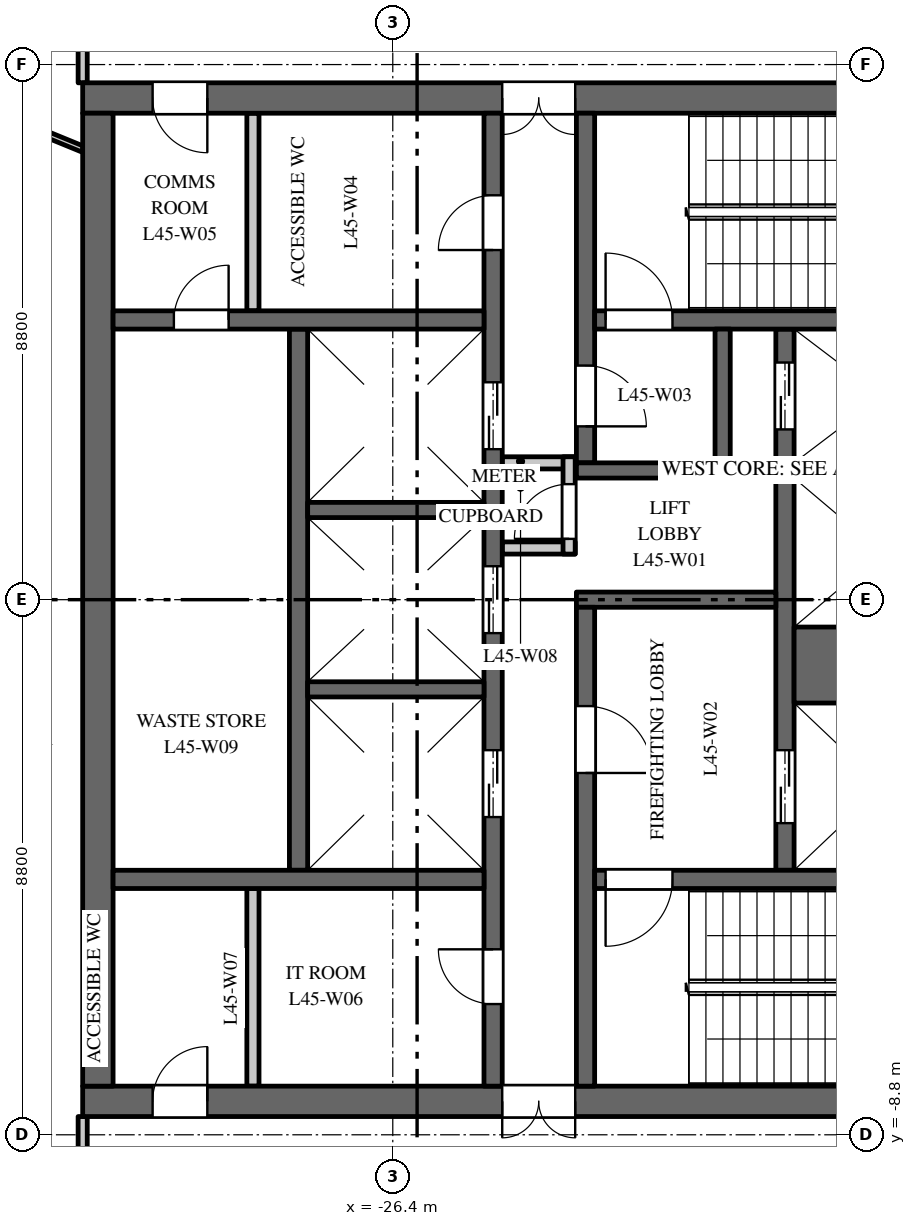
"""IFC4 building model, lengths in metres.
Left out: names, types, materials, properties, quantities, classifications, styles, units other than length and angle.
Written with IfcOpenShell. Run it as: python <this file> out.ifc"""

import sys

from ifc_helpers import new_model, si_unit, direction, frame, frame_2d, origin, place, context, subcontext, project, spatial, rectangle, extrude, element, fill, save


model = new_model("IFC4")
c1 = context("Model", 3, precision=1e-05, world=origin(), true_north=direction((0.0, 1.0)))
c2 = subcontext(c1, "Body", "Model", "MODEL_VIEW")
j1 = project(units=[si_unit("LENGTHUNIT", "METRE"), si_unit("PLANEANGLEUNIT", "RADIAN")], contexts=[c1])
p1 = place(None, origin())
s1 = spatial("IfcSite", under=j1, at=p1, CompositionType="ELEMENT")
p2 = place(p1, origin())
s2 = spatial("IfcBuilding", under=s1, at=p2, CompositionType="ELEMENT")
p3 = place(p2, frame((0.0, 0.0, 194.0)))
s3 = spatial("IfcBuildingStorey", under=s2, at=p3, CompositionType="ELEMENT", Elevation=194.0)
p4 = place(p3, frame((-16.5, 8.25, 0.0), z_axis=(0.0, 0.0, 1.0), x_axis=(-1.0, 0.0, 0.0)))
e1 = element("IfcWall", 1, at=p4, inside=s3, PredefinedType="SHEAR", context=c2, shape_type="SweptSolid", body=[
    extrude(rectangle(XDim=15.0, YDim=0.5, at=frame_2d((7.5, 0.0))), origin(), (0.0, 0.0, 1.0), 3.7),
])
p5 = place(p4, frame((6.9, 0.0, 0.0)))
e2 = element("IfcOpeningElement", 2, at=p5, cuts=e1, PredefinedType="OPENING", context=c2, shape_type="SweptSolid", body=[
    extrude(rectangle(XDim=1.2, YDim=2.1, at=frame_2d((0.6, 1.05))), frame((0.0, 0.26, 0.0), z_axis=(0.0, -1.0, 0.0), x_axis=(1.0, 0.0, 0.0)), (0.0, 0.0, 1.0), 0.52),
])
p6 = place(p4, frame((12.95, 0.0, 0.0)))
e3 = element("IfcOpeningElement", 3, at=p6, cuts=e1, PredefinedType="OPENING", context=c2, shape_type="SweptSolid", body=[
    extrude(rectangle(XDim=0.9, YDim=2.1, at=frame_2d((0.45, 1.05))), frame((0.0, 0.26, 0.0), z_axis=(0.0, -1.0, 0.0), x_axis=(1.0, 0.0, 0.0)), (0.0, 0.0, 1.0), 0.52),
])
p7 = place(p3, frame((-16.5, -8.25, 0.0), z_axis=(0.0, 0.0, 1.0), x_axis=(-1.0, 0.0, 0.0)))
e4 = element("IfcWall", 4, at=p7, inside=s3, PredefinedType="SHEAR", context=c2, shape_type="SweptSolid", body=[
    extrude(rectangle(XDim=15.0, YDim=0.5, at=frame_2d((7.5, 0.0))), origin(), (0.0, 0.0, 1.0), 3.7),
])
p8 = place(p7, frame((6.9, 0.0, 0.0)))
e5 = element("IfcOpeningElement", 5, at=p8, cuts=e4, PredefinedType="OPENING", context=c2, shape_type="SweptSolid", body=[
    extrude(rectangle(XDim=1.2, YDim=2.1, at=frame_2d((0.6, 1.05))), frame((0.0, 0.26, 0.0), z_axis=(0.0, -1.0, 0.0), x_axis=(1.0, 0.0, 0.0)), (0.0, 0.0, 1.0), 0.52),
])
p9 = place(p7, frame((12.95, 0.0, 0.0)))
e6 = element("IfcOpeningElement", 6, at=p9, cuts=e4, PredefinedType="OPENING", context=c2, shape_type="SweptSolid", body=[
    extrude(rectangle(XDim=0.9, YDim=2.1, at=frame_2d((0.45, 1.05))), frame((0.0, 0.26, 0.0), z_axis=(0.0, -1.0, 0.0), x_axis=(1.0, 0.0, 0.0)), (0.0, 0.0, 1.0), 0.52),
])
p10 = place(p3, frame((-27.95, -4.45, 0.0), z_axis=(0.0, 0.0, 1.0), x_axis=(0.0, 1.0, 0.0)))
e7 = element("IfcWall", 7, at=p10, inside=s3, PredefinedType="SHEAR", context=c2, shape_type="SweptSolid", body=[
    extrude(rectangle(XDim=8.9, YDim=0.3, at=frame_2d((4.45, 0.0))), origin(), (0.0, 0.0, 1.0), 3.7),
])
p11 = place(p3, frame((-19.95, -4.45, 0.0), z_axis=(0.0, 0.0, 1.0), x_axis=(0.0, 1.0, 0.0)))
e8 = element("IfcWall", 8, at=p11, inside=s3, PredefinedType="SHEAR", context=c2, shape_type="SweptSolid", body=[
    extrude(rectangle(XDim=8.9, YDim=0.3, at=frame_2d((4.45, 0.0))), origin(), (0.0, 0.0, 1.0), 3.7),
])
p12 = place(p11, frame((0.775, 0.0, 0.0)))
e9 = element("IfcOpeningElement", 9, at=p12, cuts=e8, PredefinedType="OPENING", context=c2, shape_type="SweptSolid", body=[
    extrude(rectangle(XDim=1.2, YDim=2.1, at=frame_2d((0.6, 1.05))), frame((0.0, 0.16, 0.0), z_axis=(0.0, -1.0, 0.0), x_axis=(1.0, 0.0, 0.0)), (0.0, 0.0, 1.0), 0.32),
])
p13 = place(p11, frame((7.25, 0.0, 0.0)))
e10 = element("IfcOpeningElement", 10, at=p13, cuts=e8, PredefinedType="OPENING", context=c2, shape_type="SweptSolid", body=[
    extrude(rectangle(XDim=1.1, YDim=2.1, at=frame_2d((0.55, 1.05))), frame((0.0, 0.16, 0.0), z_axis=(0.0, -1.0, 0.0), x_axis=(1.0, 0.0, 0.0)), (0.0, 0.0, 1.0), 0.32),
])
p14 = place(p3, frame((-24.75, -8.0, 0.0), z_axis=(0.0, 0.0, 1.0), x_axis=(0.0, 1.0, 0.0)))
e11 = element("IfcWall", 11, at=p14, inside=s3, PredefinedType="SHEAR", context=c2, shape_type="SweptSolid", body=[
    extrude(rectangle(XDim=16.0, YDim=0.3, at=frame_2d((8.0, 0.0))), origin(), (0.0, 0.0, 1.0), 3.7),
])
p15 = place(p14, frame((4.425, 0.0, 0.0)))
e12 = element("IfcOpeningElement", 12, at=p15, cuts=e11, PredefinedType="OPENING", context=c2, shape_type="SweptSolid", body=[
    extrude(rectangle(XDim=1.1, YDim=2.1, at=frame_2d((0.55, 1.05))), frame((0.0, 0.16, 0.0), z_axis=(0.0, -1.0, 0.0), x_axis=(1.0, 0.0, 0.0)), (0.0, 0.0, 1.0), 0.32),
])
p16 = place(p14, frame((7.45, 0.0, 0.0)))
e13 = element("IfcOpeningElement", 13, at=p16, cuts=e11, PredefinedType="OPENING", context=c2, shape_type="SweptSolid", body=[
    extrude(rectangle(XDim=1.1, YDim=2.1, at=frame_2d((0.55, 1.05))), frame((0.0, 0.16, 0.0), z_axis=(0.0, -1.0, 0.0), x_axis=(1.0, 0.0, 0.0)), (0.0, 0.0, 1.0), 0.32),
])
p17 = place(p14, frame((10.475, 0.0, 0.0)))
e14 = element("IfcOpeningElement", 14, at=p17, cuts=e11, PredefinedType="OPENING", context=c2, shape_type="SweptSolid", body=[
    extrude(rectangle(XDim=1.1, YDim=2.1, at=frame_2d((0.55, 1.05))), frame((0.0, 0.16, 0.0), z_axis=(0.0, -1.0, 0.0), x_axis=(1.0, 0.0, 0.0)), (0.0, 0.0, 1.0), 0.32),
])
p18 = place(p14, frame((13.75, 0.0, 0.0)))
e15 = element("IfcOpeningElement", 15, at=p18, cuts=e11, PredefinedType="OPENING", context=c2, shape_type="SweptSolid", body=[
    extrude(rectangle(XDim=0.9, YDim=2.1, at=frame_2d((0.45, 1.05))), frame((0.0, 0.16, 0.0), z_axis=(0.0, -1.0, 0.0), x_axis=(1.0, 0.0, 0.0)), (0.0, 0.0, 1.0), 0.32),
])
p19 = place(p14, frame((1.35, 0.0, 0.0)))
e16 = element("IfcOpeningElement", 16, at=p19, cuts=e11, PredefinedType="OPENING", context=c2, shape_type="SweptSolid", body=[
    extrude(rectangle(XDim=0.9, YDim=2.1, at=frame_2d((0.45, 1.05))), frame((0.0, 0.16, 0.0), z_axis=(0.0, -1.0, 0.0), x_axis=(1.0, 0.0, 0.0)), (0.0, 0.0, 1.0), 0.32),
])
p20 = place(p3, frame((-20.1, 0.0, 0.0), z_axis=(0.0, 0.0, 1.0), x_axis=(-1.0, 0.0, 0.0)))
e17 = element("IfcWall", 17, at=p20, inside=s3, PredefinedType="SHEAR", context=c2, shape_type="SweptSolid", body=[
    extrude(rectangle(XDim=3.28, YDim=0.25, at=frame_2d((1.64, 0.0))), origin(), (0.0, 0.0, 1.0), 3.7),
])
for number, where, z_axis, x_axis in (
    (18, (-23.4, 0.85, 0.0), (0.0, 0.0, 1.0), (-1.0, 0.0, 0.0)),
    (19, (-23.4, 2.25, 0.0), (0.0, 0.0, 1.0), (-1.0, 0.0, 0.0)),
):
    element("IfcWall", number, at=place(p3, frame(where, z_axis=z_axis, x_axis=x_axis)), inside=s3, PredefinedType="PARTITIONING", context=c2, shape_type="SweptSolid", body=[
        extrude(rectangle(XDim=1.2, YDim=0.2, at=frame_2d((0.6, 0.0))), origin(), (0.0, 0.0, 1.0), 3.7),
    ])
p21 = place(p3, frame((-23.5, 0.75, 0.0), z_axis=(0.0, 0.0, 1.0), x_axis=(0.0, 1.0, 0.0)))
e20 = element("IfcWall", 20, at=p21, inside=s3, PredefinedType="PARTITIONING", context=c2, shape_type="SweptSolid", body=[
    extrude(rectangle(XDim=1.6, YDim=0.2, at=frame_2d((0.8, 0.0))), origin(), (0.0, 0.0, 1.0), 3.7),
])
p22 = place(p21, frame((0.25, 0.0, 0.0)))
e21 = element("IfcOpeningElement", 21, at=p22, cuts=e20, PredefinedType="OPENING", context=c2, shape_type="SweptSolid", body=[
    extrude(rectangle(XDim=0.9, YDim=2.1, at=frame_2d((0.45, 1.05))), frame((0.0, 0.11, 0.0), z_axis=(0.0, -1.0, 0.0), x_axis=(1.0, 0.0, 0.0)), (0.0, 0.0, 1.0), 0.22),
])
p23 = place(p3, frame((-31.25, -8.0, 0.0), z_axis=(0.0, 0.0, 1.0), x_axis=(0.0, 1.0, 0.0)))
e22 = element("IfcWall", 22, at=p23, inside=s3, PredefinedType="SHEAR", context=c2, shape_type="SweptSolid", body=[
    extrude(rectangle(XDim=16.0, YDim=0.5, at=frame_2d((8.0, 0.0))), origin(), (0.0, 0.0, 1.0), 3.7),
])
p24 = place(p3, frame((-24.9, 4.6, 0.0), z_axis=(0.0, 0.0, 1.0), x_axis=(-1.0, 0.0, 0.0)))
e23 = element("IfcWall", 23, at=p24, inside=s3, PredefinedType="SHEAR", context=c2, shape_type="SweptSolid", body=[
    extrude(rectangle(XDim=6.1, YDim=0.3, at=frame_2d((3.05, 0.0))), origin(), (0.0, 0.0, 1.0), 3.7),
])
p25 = place(p24, frame((4.2, 0.0, 0.0)))
e24 = element("IfcOpeningElement", 24, at=p25, cuts=e23, PredefinedType="OPENING", context=c2, shape_type="SweptSolid", body=[
    extrude(rectangle(XDim=0.9, YDim=2.1, at=frame_2d((0.45, 1.05))), frame((0.0, 0.16, 0.0), z_axis=(0.0, -1.0, 0.0), x_axis=(1.0, 0.0, 0.0)), (0.0, 0.0, 1.0), 0.32),
])
for number, where, z_axis, x_axis in (
    (25, (-28.7, 4.75, 0.0), (0.0, 0.0, 1.0), (0.0, 1.0, 0.0)),
    (26, (-28.7, -8.0, 0.0), (0.0, 0.0, 1.0), (0.0, 1.0, 0.0)),
):
    element("IfcWall", number, at=place(p3, frame(where, z_axis=z_axis, x_axis=x_axis)), inside=s3, PredefinedType="PARTITIONING", context=c2, shape_type="SweptSolid", body=[
        extrude(rectangle(XDim=3.25, YDim=0.2, at=frame_2d((1.625, 0.0))), origin(), (0.0, 0.0, 1.0), 3.7),
    ])
p26 = place(p3, frame((-24.9, -4.6, 0.0), z_axis=(0.0, 0.0, 1.0), x_axis=(-1.0, 0.0, 0.0)))
e27 = element("IfcWall", 27, at=p26, inside=s3, PredefinedType="SHEAR", context=c2, shape_type="SweptSolid", body=[
    extrude(rectangle(XDim=6.1, YDim=0.3, at=frame_2d((3.05, 0.0))), origin(), (0.0, 0.0, 1.0), 3.7),
])
p27 = place(p3, frame((-16.9, -1.075, 0.0), z_axis=(0.0, 0.0, 1.0), x_axis=(-1.0, 0.0, 0.0)))
e28 = element("IfcWall", 28, at=p27, inside=s3, PredefinedType="SHEAR", context=c2, shape_type="SweptSolid", body=[
    extrude(rectangle(XDim=2.9, YDim=1.25, at=frame_2d((1.45, 0.0))), origin(), (0.0, 0.0, 1.0), 3.7),
])
for number, where, z_axis, x_axis in (
    (29, (-16.9, 2.125, 0.0), (0.0, 0.0, 1.0), (-1.0, 0.0, 0.0)),
    (30, (-24.9, -1.475, 0.0), (0.0, 0.0, 1.0), (-1.0, 0.0, 0.0)),
    (31, (-24.9, 1.475, 0.0), (0.0, 0.0, 1.0), (-1.0, 0.0, 0.0)),
):
    element("IfcWall", number, at=place(p3, frame(where, z_axis=z_axis, x_axis=x_axis)), inside=s3, PredefinedType="SHEAR", context=c2, shape_type="SweptSolid", body=[
        extrude(rectangle(XDim=2.9, YDim=0.25, at=frame_2d((1.45, 0.0))), origin(), (0.0, 0.0, 1.0), 3.7),
    ])
p28 = place(p3, frame((-23.23, 2.25, 0.0), z_axis=(0.0, 0.0, 1.0), x_axis=(0.0, 1.0, 0.0)))
e32 = element("IfcWall", 32, at=p28, inside=s3, PredefinedType="SHEAR", context=c2, shape_type="SweptSolid", body=[
    extrude(rectangle(XDim=5.75, YDim=0.3, at=frame_2d((2.875, 0.0))), origin(), (0.0, 0.0, 1.0), 3.7),
])
p29 = place(p28, frame((0.6, 0.0, 0.0)))
e33 = element("IfcOpeningElement", 33, at=p29, cuts=e32, PredefinedType="OPENING", context=c2, shape_type="SweptSolid", body=[
    extrude(rectangle(XDim=1.0, YDim=2.1, at=frame_2d((0.5, 1.05))), frame((0.0, 0.16, 0.0), z_axis=(0.0, -1.0, 0.0), x_axis=(1.0, 0.0, 0.0)), (0.0, 0.0, 1.0), 0.32),
])
p30 = place(p3, frame((-23.23, -8.0, 0.0), z_axis=(0.0, 0.0, 1.0), x_axis=(0.0, 1.0, 0.0)))
e34 = element("IfcWall", 34, at=p30, inside=s3, PredefinedType="SHEAR", context=c2, shape_type="SweptSolid", body=[
    extrude(rectangle(XDim=7.875, YDim=0.3, at=frame_2d((3.938, 0.0))), origin(), (0.0, 0.0, 1.0), 3.7),
])
p31 = place(p30, frame((5.15, 0.0, 0.0)))
e35 = element("IfcOpeningElement", 35, at=p31, cuts=e34, PredefinedType="OPENING", context=c2, shape_type="SweptSolid", body=[
    extrude(rectangle(XDim=1.1, YDim=2.1, at=frame_2d((0.55, 1.05))), frame((0.0, 0.16, 0.0), z_axis=(0.0, -1.0, 0.0), x_axis=(1.0, 0.0, 0.0)), (0.0, 0.0, 1.0), 0.32),
])
p32 = place(p3, frame((-16.9, 4.6, 0.0), z_axis=(0.0, 0.0, 1.0), x_axis=(-1.0, 0.0, 0.0)))
e36 = element("IfcWall", 36, at=p32, inside=s3, PredefinedType="SHEAR", context=c2, shape_type="SweptSolid", body=[
    extrude(rectangle(XDim=6.18, YDim=0.3, at=frame_2d((3.09, 0.0))), origin(), (0.0, 0.0, 1.0), 3.7),
])
p33 = place(p32, frame((4.9, 0.0, 0.0)))
e37 = element("IfcOpeningElement", 37, at=p33, cuts=e36, PredefinedType="OPENING", context=c2, shape_type="SweptSolid", body=[
    extrude(rectangle(XDim=1.1, YDim=2.1, at=frame_2d((0.55, 1.05))), frame((0.0, 0.16, 0.0), z_axis=(0.0, -1.0, 0.0), x_axis=(1.0, 0.0, 0.0)), (0.0, 0.0, 1.0), 0.32),
])
p34 = place(p3, frame((-16.9, -4.6, 0.0), z_axis=(0.0, 0.0, 1.0), x_axis=(-1.0, 0.0, 0.0)))
e38 = element("IfcWall", 38, at=p34, inside=s3, PredefinedType="SHEAR", context=c2, shape_type="SweptSolid", body=[
    extrude(rectangle(XDim=6.18, YDim=0.3, at=frame_2d((3.09, 0.0))), origin(), (0.0, 0.0, 1.0), 3.7),
])
p35 = place(p34, frame((4.9, 0.0, 0.0)))
e39 = element("IfcOpeningElement", 39, at=p35, cuts=e38, PredefinedType="OPENING", context=c2, shape_type="SweptSolid", body=[
    extrude(rectangle(XDim=1.1, YDim=2.1, at=frame_2d((0.55, 1.05))), frame((0.0, 0.16, 0.0), z_axis=(0.0, -1.0, 0.0), x_axis=(1.0, 0.0, 0.0)), (0.0, 0.0, 1.0), 0.32),
])
p36 = place(p3, frame((-20.85, 2.125, 0.0), z_axis=(0.0, 0.0, 1.0), x_axis=(-1.0, 0.0, 0.0)))
e40 = element("IfcWall", 40, at=p36, inside=s3, PredefinedType="SHEAR", context=c2, shape_type="SweptSolid", body=[
    extrude(rectangle(XDim=2.53, YDim=0.25, at=frame_2d((1.265, 0.0))), origin(), (0.0, 0.0, 1.0), 3.7),
])
p37 = place(p3, frame((-20.975, 2.25, 0.0), z_axis=(0.0, 0.0, 1.0), x_axis=(0.0, 1.0, 0.0)))
e41 = element("IfcWall", 41, at=p37, inside=s3, PredefinedType="SHEAR", context=c2, shape_type="SweptSolid", body=[
    extrude(rectangle(XDim=2.2, YDim=0.25, at=frame_2d((1.1, 0.0))), origin(), (0.0, 0.0, 1.0), 3.7),
])
p38 = place(p3, frame((-34.234, 8.53, 0.0), z_axis=(0.0, 0.0, 1.0), x_axis=(0.925344112436, -0.379128307542, 0.0)))
e42 = element("IfcWall", 42, at=p38, inside=s3, PredefinedType="PARTITIONING", context=c2, shape_type="SweptSolid", body=[
    extrude(rectangle(XDim=2.954, YDim=0.1, at=frame_2d((1.477, 0.0))), origin(), (0.0, 0.0, 1.0), 2.9),
])
for number, where, z_axis, x_axis in (
    (43, (-31.5, -10.7, 0.0), (0.0, 0.0, 1.0), (0.0, 1.0, 0.0)),
    (44, (-31.5, 8.5, 0.0), (0.0, 0.0, 1.0), (0.0, 1.0, 0.0)),
):
    element("IfcWall", number, at=place(p3, frame(where, z_axis=z_axis, x_axis=x_axis)), inside=s3, PredefinedType="PARTITIONING", context=c2, shape_type="SweptSolid", body=[
        extrude(rectangle(XDim=2.2, YDim=0.15, at=frame_2d((1.1, 0.0))), origin(), (0.0, 0.0, 1.0), 3.7),
    ])
p39 = place(p12, origin())
e45 = element("IfcDoor", 45, at=p39, inside=s3, OperationType="DOUBLE_DOOR_SLIDING", PredefinedType="DOOR", context=c2, shape_type="SweptSolid", body=[
    extrude(rectangle(XDim=1.2, YDim=2.1, at=frame_2d((0.6, 1.05))), frame((0.0, 0.025, 0.0), z_axis=(0.0, -1.0, 0.0), x_axis=(1.0, 0.0, 0.0)), (0.0, 0.0, 1.0), 0.05),
])
fill(e9, e45)
p40 = place(p13, origin())
e46 = element("IfcDoor", 46, at=p40, inside=s3, OperationType="DOUBLE_DOOR_SLIDING", PredefinedType="DOOR", context=c2, shape_type="SweptSolid", body=[
    extrude(rectangle(XDim=1.1, YDim=2.1, at=frame_2d((0.55, 1.05))), frame((0.0, 0.025, 0.0), z_axis=(0.0, -1.0, 0.0), x_axis=(1.0, 0.0, 0.0)), (0.0, 0.0, 1.0), 0.05),
])
fill(e10, e46)
p41 = place(p15, origin())
e47 = element("IfcDoor", 47, at=p41, inside=s3, OperationType="DOUBLE_DOOR_SLIDING", PredefinedType="DOOR", context=c2, shape_type="SweptSolid", body=[
    extrude(rectangle(XDim=1.1, YDim=2.1, at=frame_2d((0.55, 1.05))), frame((0.0, 0.025, 0.0), z_axis=(0.0, -1.0, 0.0), x_axis=(1.0, 0.0, 0.0)), (0.0, 0.0, 1.0), 0.05),
])
fill(e12, e47)
p42 = place(p16, origin())
e48 = element("IfcDoor", 48, at=p42, inside=s3, OperationType="DOUBLE_DOOR_SLIDING", PredefinedType="DOOR", context=c2, shape_type="SweptSolid", body=[
    extrude(rectangle(XDim=1.1, YDim=2.1, at=frame_2d((0.55, 1.05))), frame((0.0, 0.025, 0.0), z_axis=(0.0, -1.0, 0.0), x_axis=(1.0, 0.0, 0.0)), (0.0, 0.0, 1.0), 0.05),
])
fill(e13, e48)
p43 = place(p17, origin())
e49 = element("IfcDoor", 49, at=p43, inside=s3, OperationType="DOUBLE_DOOR_SLIDING", PredefinedType="DOOR", context=c2, shape_type="SweptSolid", body=[
    extrude(rectangle(XDim=1.1, YDim=2.1, at=frame_2d((0.55, 1.05))), frame((0.0, 0.025, 0.0), z_axis=(0.0, -1.0, 0.0), x_axis=(1.0, 0.0, 0.0)), (0.0, 0.0, 1.0), 0.05),
])
fill(e14, e49)
p44 = place(p33, origin())
e50 = element("IfcDoor", 50, at=p44, inside=s3, OperationType="SINGLE_SWING_RIGHT", PredefinedType="DOOR", context=c2, shape_type="SweptSolid", body=[
    extrude(rectangle(XDim=1.1, YDim=2.1, at=frame_2d((0.55, 1.05))), frame((0.0, 0.025, 0.0), z_axis=(0.0, -1.0, 0.0), x_axis=(1.0, 0.0, 0.0)), (0.0, 0.0, 1.0), 0.05),
])
fill(e37, e50)
p45 = place(p35, origin())
e51 = element("IfcDoor", 51, at=p45, inside=s3, OperationType="SINGLE_SWING_LEFT", PredefinedType="DOOR", context=c2, shape_type="SweptSolid", body=[
    extrude(rectangle(XDim=1.1, YDim=2.1, at=frame_2d((0.55, 1.05))), frame((0.0, 0.025, 0.0), z_axis=(0.0, -1.0, 0.0), x_axis=(1.0, 0.0, 0.0)), (0.0, 0.0, 1.0), 0.05),
])
fill(e39, e51)
p46 = place(p31, origin())
e52 = element("IfcDoor", 52, at=p46, inside=s3, OperationType="SINGLE_SWING_LEFT", PredefinedType="DOOR", context=c2, shape_type="SweptSolid", body=[
    extrude(rectangle(XDim=1.1, YDim=2.1, at=frame_2d((0.55, 1.05))), frame((0.0, 0.025, 0.0), z_axis=(0.0, -1.0, 0.0), x_axis=(1.0, 0.0, 0.0)), (0.0, 0.0, 1.0), 0.05),
])
fill(e35, e52)
p47 = place(p29, origin())
e53 = element("IfcDoor", 53, at=p47, inside=s3, OperationType="SINGLE_SWING_LEFT", PredefinedType="DOOR", context=c2, shape_type="SweptSolid", body=[
    extrude(rectangle(XDim=1.0, YDim=2.1, at=frame_2d((0.5, 1.05))), frame((0.0, 0.025, 0.0), z_axis=(0.0, -1.0, 0.0), x_axis=(1.0, 0.0, 0.0)), (0.0, 0.0, 1.0), 0.05),
])
fill(e33, e53)
p48 = place(p5, origin())
e54 = element("IfcDoor", 54, at=p48, inside=s3, OperationType="DOUBLE_DOOR_DOUBLE_SWING", PredefinedType="DOOR", context=c2, shape_type="SweptSolid", body=[
    extrude(rectangle(XDim=1.2, YDim=2.1, at=frame_2d((0.6, 1.05))), frame((0.0, 0.025, 0.0), z_axis=(0.0, -1.0, 0.0), x_axis=(1.0, 0.0, 0.0)), (0.0, 0.0, 1.0), 0.05),
])
fill(e2, e54)
p49 = place(p8, origin())
e55 = element("IfcDoor", 55, at=p49, inside=s3, OperationType="DOUBLE_DOOR_DOUBLE_SWING", PredefinedType="DOOR", context=c2, shape_type="SweptSolid", body=[
    extrude(rectangle(XDim=1.2, YDim=2.1, at=frame_2d((0.6, 1.05))), frame((0.0, 0.025, 0.0), z_axis=(0.0, -1.0, 0.0), x_axis=(1.0, 0.0, 0.0)), (0.0, 0.0, 1.0), 0.05),
])
fill(e5, e55)
p50 = place(p18, origin())
e56 = element("IfcDoor", 56, at=p50, inside=s3, OperationType="SINGLE_SWING_RIGHT", PredefinedType="DOOR", context=c2, shape_type="SweptSolid", body=[
    extrude(rectangle(XDim=0.9, YDim=2.1, at=frame_2d((0.45, 1.05))), frame((0.0, 0.025, 0.0), z_axis=(0.0, -1.0, 0.0), x_axis=(1.0, 0.0, 0.0)), (0.0, 0.0, 1.0), 0.05),
])
fill(e15, e56)
p51 = place(p6, origin())
e57 = element("IfcDoor", 57, at=p51, inside=s3, OperationType="SINGLE_SWING_RIGHT", PredefinedType="DOOR", context=c2, shape_type="SweptSolid", body=[
    extrude(rectangle(XDim=0.9, YDim=2.1, at=frame_2d((0.45, 1.05))), frame((0.0, 0.025, 0.0), z_axis=(0.0, -1.0, 0.0), x_axis=(1.0, 0.0, 0.0)), (0.0, 0.0, 1.0), 0.05),
])
fill(e3, e57)
p52 = place(p19, origin())
e58 = element("IfcDoor", 58, at=p52, inside=s3, OperationType="SINGLE_SWING_LEFT", PredefinedType="DOOR", context=c2, shape_type="SweptSolid", body=[
    extrude(rectangle(XDim=0.9, YDim=2.1, at=frame_2d((0.45, 1.05))), frame((0.0, 0.025, 0.0), z_axis=(0.0, -1.0, 0.0), x_axis=(1.0, 0.0, 0.0)), (0.0, 0.0, 1.0), 0.05),
])
fill(e16, e58)
p53 = place(p9, origin())
e59 = element("IfcDoor", 59, at=p53, inside=s3, OperationType="SINGLE_SWING_LEFT", PredefinedType="DOOR", context=c2, shape_type="SweptSolid", body=[
    extrude(rectangle(XDim=0.9, YDim=2.1, at=frame_2d((0.45, 1.05))), frame((0.0, 0.025, 0.0), z_axis=(0.0, -1.0, 0.0), x_axis=(1.0, 0.0, 0.0)), (0.0, 0.0, 1.0), 0.05),
])
fill(e6, e59)
p54 = place(p22, origin())
e60 = element("IfcDoor", 60, at=p54, inside=s3, OperationType="SINGLE_SWING_RIGHT", PredefinedType="DOOR", context=c2, shape_type="SweptSolid", body=[
    extrude(rectangle(XDim=0.9, YDim=2.1, at=frame_2d((0.45, 1.05))), frame((0.0, 0.025, 0.0), z_axis=(0.0, -1.0, 0.0), x_axis=(1.0, 0.0, 0.0)), (0.0, 0.0, 1.0), 0.05),
])
fill(e21, e60)
p55 = place(p25, origin())
e61 = element("IfcDoor", 61, at=p55, inside=s3, OperationType="SINGLE_SWING_LEFT", PredefinedType="DOOR", context=c2, shape_type="SweptSolid", body=[
    extrude(rectangle(XDim=0.9, YDim=2.1, at=frame_2d((0.45, 1.05))), frame((0.0, 0.025, 0.0), z_axis=(0.0, -1.0, 0.0), x_axis=(1.0, 0.0, 0.0)), (0.0, 0.0, 1.0), 0.05),
])
fill(e24, e61)
save(model, sys.argv[1])
